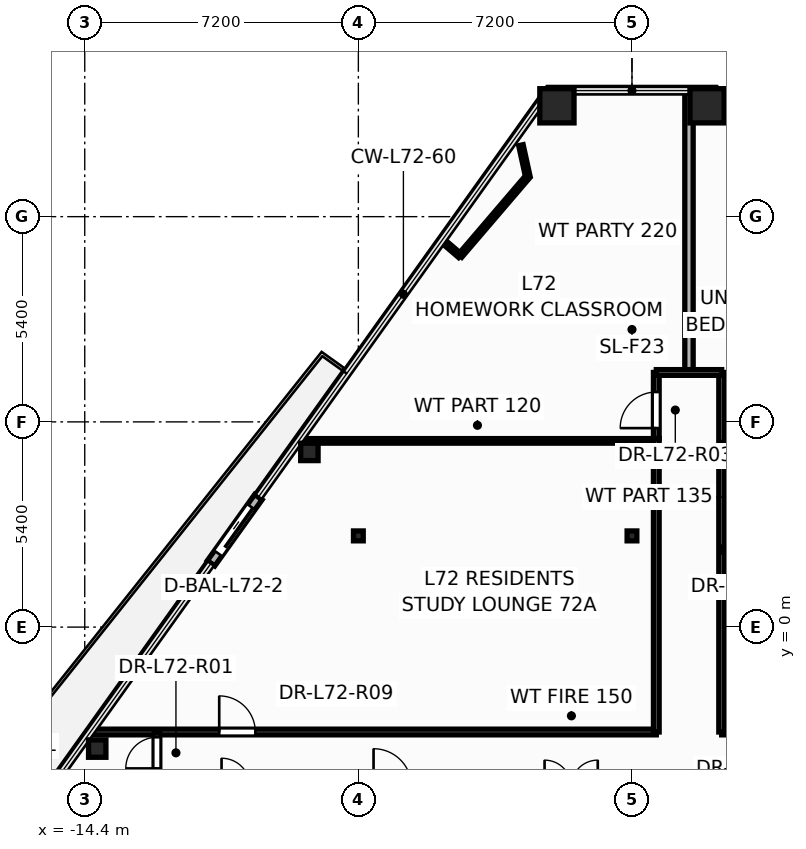
"""IFC4 building model, lengths in metres.
Left out: names, types, materials, properties, quantities, classifications, styles, units other than length and angle.
Written with IfcOpenShell. Run it as: python <this file> out.ifc"""

import sys

from ifc_helpers import new_model, si_unit, direction, frame, frame_2d, origin, origin_2d, place, context, subcontext, project, spatial, rectangle, hollow_rectangle, hollow_circle, i_section, extrude, element, fill, save


model = new_model("IFC4")
c1 = context("Model", 3, precision=1e-05, world=origin(), true_north=direction((0.0, 1.0)))
c2 = subcontext(c1, "Body", "Model", "MODEL_VIEW")
j1 = project(units=[si_unit("LENGTHUNIT", "METRE"), si_unit("PLANEANGLEUNIT", "RADIAN")], contexts=[c1])
p1 = place(None, origin())
s1 = spatial("IfcSite", under=j1, at=p1, CompositionType="ELEMENT")
p2 = place(p1, origin())
s2 = spatial("IfcBuilding", under=s1, at=p2, CompositionType="ELEMENT")
p3 = place(p2, frame((0.0, 0.0, 274.2)))
s3 = spatial("IfcBuildingStorey", under=s2, at=p3, CompositionType="ELEMENT", Elevation=274.2)
for number, where, z_axis, x_axis in (
    (1, (1.975, 13.717, 0.0), (0.0, 0.0, 1.0), (1.0, 0.0, 0.0)),
    (2, (-1.975, 13.717, 0.0), (0.0, 0.0, 1.0), (1.0, 0.0, 0.0)),
):
    element("IfcColumn", number, at=place(p3, frame(where, z_axis=z_axis, x_axis=x_axis)), inside=s3, PredefinedType="COLUMN", context=c2, shape_type="SweptSolid", body=[
        extrude(hollow_rectangle(XDim=0.9, YDim=0.9, WallThickness=0.04, at=origin_2d()), origin(), (0.0, 0.0, 1.0), 3.6),
    ])
for number, where, z_axis, x_axis in (
    (3, (-8.489, 4.61, 0.0), (0.0, 0.0, 1.0), (1.0, 0.0, 0.0)),
    (4, (-14.072, -3.196, 0.0), (0.0, 0.0, 1.0), (1.0, 0.0, 0.0)),
):
    element("IfcColumn", number, at=place(p3, frame(where, z_axis=z_axis, x_axis=x_axis)), inside=s3, PredefinedType="COLUMN", context=c2, shape_type="SweptSolid", body=[
        extrude(hollow_circle(Radius=0.229, WallThickness=0.016, at=origin_2d()), origin(), (0.0, 0.0, 1.0), 3.6),
    ])
for number, where, z_axis, x_axis in (
    (5, (-7.2, 2.4, 0.0), (0.0, 0.0, 1.0), (1.0, 0.0, 0.0)),
    (6, (0.0, 2.4, 0.0), (0.0, 0.0, 1.0), (1.0, 0.0, 0.0)),
    (7, (-4.8, 8.4, 0.0), (0.0, 0.0, 1.0), (1.0, 0.0, 0.0)),
    (8, (0.0, 8.4, 0.0), (0.0, 0.0, 1.0), (1.0, 0.0, 0.0)),
):
    element("IfcColumn", number, at=place(p3, frame(where, z_axis=z_axis, x_axis=x_axis)), inside=s3, PredefinedType="COLUMN", context=c2, shape_type="SweptSolid", body=[
        extrude(i_section(OverallWidth=0.256, OverallDepth=0.26, WebThickness=0.01, FlangeThickness=0.017, at=origin_2d()), origin(), (0.0, 0.0, 1.0), 3.6),
    ])
p4 = place(p3, frame((-9.831, 3.42, -0.015), z_axis=(0.0, 0.0, 1.0), x_axis=(-0.581756116184, -0.81336327756, 0.0)))
e9 = element("IfcWall", 9, at=p4, inside=s3, PredefinedType="STANDARD", context=c2, shape_type="SweptSolid", body=[
    extrude(rectangle(XDim=2.14, YDim=0.24, at=frame_2d((1.07, 0.0))), origin(), (0.0, 0.0, 1.0), 2.878),
])
p5 = place(p4, frame((0.32, 0.0, 0.015)))
e10 = element("IfcOpeningElement", 10, at=p5, cuts=e9, PredefinedType="OPENING", context=c2, shape_type="SweptSolid", body=[
    extrude(rectangle(XDim=1.506, YDim=2.204, at=frame_2d((0.75, 1.102))), frame((0.0, 0.13, 0.0), z_axis=(0.0, -1.0, 0.0), x_axis=(1.0, 0.0, 0.0)), (0.0, 0.0, 1.0), 0.26),
])
p6 = place(p3, frame((-14.251, -2.76, 0.0), z_axis=(0.0, 0.0, 1.0), x_axis=(1.0, 0.0, 0.0)))
e11 = element("IfcWall", 11, at=p6, inside=s3, PredefinedType="PARTITIONING", context=c2, shape_type="SweptSolid", body=[
    extrude(rectangle(XDim=14.891, YDim=0.15, at=frame_2d((7.446, 0.0))), origin(), (0.0, 0.0, 1.0), 2.32),
])
p7 = place(p6, frame((3.39, 0.0, 0.0)))
e12 = element("IfcOpeningElement", 12, at=p7, cuts=e11, PredefinedType="OPENING", context=c2, shape_type="SweptSolid", body=[
    extrude(rectangle(XDim=0.956, YDim=2.104, at=frame_2d((0.475, 1.052))), frame((0.0, 0.085, 0.0), z_axis=(0.0, -1.0, 0.0), x_axis=(1.0, 0.0, 0.0)), (0.0, 0.0, 1.0), 0.17),
])
p8 = place(p3, frame((-8.773, 4.9, 0.0), z_axis=(0.0, 0.0, 1.0), x_axis=(1.0, 0.0, 0.0)))
e13 = element("IfcWall", 13, at=p8, inside=s3, PredefinedType="PARTITIONING", context=c2, shape_type="SweptSolid", body=[
    extrude(rectangle(XDim=9.413, YDim=0.12, at=frame_2d((4.706, 0.0))), origin(), (0.0, 0.0, 1.0), 2.32),
])
p9 = place(p3, frame((0.64, -2.76, 0.0), z_axis=(0.0, 0.0, 1.0), x_axis=(0.0, 1.0, 0.0)))
e14 = element("IfcWall", 14, at=p9, inside=s3, PredefinedType="PARTITIONING", context=c2, shape_type="SweptSolid", body=[
    extrude(rectangle(XDim=7.72, YDim=0.15, at=frame_2d((3.86, 0.0))), origin(), (0.0, 0.0, 1.0), 2.32),
])
p10 = place(p3, frame((1.5, 6.7, 0.0), z_axis=(0.0, 0.0, 1.0), x_axis=(0.0, 1.0, 0.0)))
e15 = element("IfcWall", 15, at=p10, inside=s3, PredefinedType="PARTITIONING", context=c2, shape_type="SweptSolid", body=[
    extrude(rectangle(XDim=7.417, YDim=0.22, at=frame_2d((3.708, 0.0))), origin(), (0.0, 0.0, 1.0), 2.32),
])
p11 = place(p3, frame((2.36, -2.76, 0.0), z_axis=(0.0, 0.0, 1.0), x_axis=(1.0, 0.0, 0.0)))
e16 = element("IfcWall", 16, at=p11, inside=s3, PredefinedType="PARTITIONING", context=c2, shape_type="SweptSolid", body=[
    extrude(rectangle(XDim=4.978, YDim=0.15, at=frame_2d((2.489, 0.0))), origin(), (0.0, 0.0, 1.0), 2.32),
])
p12 = place(p11, frame((0.359, 0.0, 0.0)))
e17 = element("IfcOpeningElement", 17, at=p12, cuts=e16, PredefinedType="OPENING", context=c2, shape_type="SweptSolid", body=[
    extrude(rectangle(XDim=0.956, YDim=2.104, at=frame_2d((0.475, 1.052))), frame((0.0, 0.085, 0.0), z_axis=(0.0, -1.0, 0.0), x_axis=(1.0, 0.0, 0.0)), (0.0, 0.0, 1.0), 0.17),
])
p13 = place(p3, frame((2.36, -2.76, 0.0), z_axis=(0.0, 0.0, 1.0), x_axis=(0.0, 1.0, 0.0)))
e18 = element("IfcWall", 18, at=p13, inside=s3, PredefinedType="PARTITIONING", context=c2, shape_type="SweptSolid", body=[
    extrude(rectangle(XDim=9.46, YDim=0.15, at=frame_2d((4.73, 0.0))), origin(), (0.0, 0.0, 1.0), 2.32),
])
p14 = place(p3, frame((-2.741, 11.855, 0.0), z_axis=(0.0, 0.0, 1.0), x_axis=(-0.649984417987, -0.759947535277, 0.0)))
e19 = element("IfcWall", 19, at=p14, inside=s3, PredefinedType="PARTITIONING", context=c2, shape_type="SweptSolid", body=[
    extrude(rectangle(XDim=2.742, YDim=0.12, at=frame_2d((1.371, 0.0))), origin(), (0.0, 0.0, 1.0), 2.32),
])
p15 = place(p3, frame((0.64, 4.962, 0.0), z_axis=(0.0, 0.0, 1.0), x_axis=(0.0, 1.0, 0.0)))
e20 = element("IfcWall", 20, at=p15, inside=s3, PredefinedType="PARTITIONING", context=c2, shape_type="SweptSolid", body=[
    extrude(rectangle(XDim=1.738, YDim=0.15, at=frame_2d((0.869, 0.0))), origin(), (0.0, 0.0, 1.0), 3.345),
])
p16 = place(p15, frame((0.274, 0.0, 0.0)))
e21 = element("IfcOpeningElement", 21, at=p16, cuts=e20, PredefinedType="OPENING", context=c2, shape_type="SweptSolid", body=[
    extrude(rectangle(XDim=0.956, YDim=2.104, at=frame_2d((0.475, 1.052))), frame((0.0, 0.085, 0.0), z_axis=(0.0, -1.0, 0.0), x_axis=(1.0, 0.0, 0.0)), (0.0, 0.0, 1.0), 0.17),
])
p17 = place(p3, frame((-12.5, -4.24, 0.0), z_axis=(0.0, 0.0, 1.0), x_axis=(0.0, 1.0, 0.0)))
e22 = element("IfcWall", 22, at=p17, inside=s3, PredefinedType="PARTITIONING", context=c2, shape_type="SweptSolid", body=[
    extrude(rectangle(XDim=1.48, YDim=0.15, at=frame_2d((0.74, 0.0))), origin(), (0.0, 0.0, 1.0), 2.32),
])
p18 = place(p17, frame((0.522, 0.0, 0.0)))
e23 = element("IfcOpeningElement", 23, at=p18, cuts=e22, PredefinedType="OPENING", context=c2, shape_type="SweptSolid", body=[
    extrude(rectangle(XDim=0.826, YDim=2.104, at=frame_2d((0.41, 1.052))), frame((0.0, 0.085, 0.0), z_axis=(0.0, -1.0, 0.0), x_axis=(1.0, 0.0, 0.0)), (0.0, 0.0, 1.0), 0.17),
])
p19 = place(p3, frame((2.36, 2.04, 0.0), z_axis=(0.0, 0.0, 1.0), x_axis=(1.0, 0.0, 0.0)))
e24 = element("IfcWall", 24, at=p19, inside=s3, PredefinedType="PARTITIONING", context=c2, shape_type="SweptSolid", body=[
    extrude(rectangle(XDim=1.318, YDim=0.135, at=frame_2d((0.659, 0.0))), origin(), (0.0, 0.0, 1.0), 2.964),
])
p20 = place(p19, frame((0.276, 0.0, 0.0)))
e25 = element("IfcOpeningElement", 25, at=p20, cuts=e24, PredefinedType="OPENING", context=c2, shape_type="SweptSolid", body=[
    extrude(rectangle(XDim=0.856, YDim=2.104, at=frame_2d((0.425, 1.052))), frame((0.0, 0.078, 0.0), z_axis=(0.0, -1.0, 0.0), x_axis=(1.0, 0.0, 0.0)), (0.0, 0.0, 1.0), 0.155),
])
p21 = place(p3, frame((2.36, 4.8, 0.0), z_axis=(0.0, 0.0, 1.0), x_axis=(1.0, 0.0, 0.0)))
e26 = element("IfcWall", 26, at=p21, inside=s3, PredefinedType="PARTITIONING", context=c2, shape_type="SweptSolid", body=[
    extrude(rectangle(XDim=1.4, YDim=0.135, at=frame_2d((0.7, 0.0))), origin(), (0.0, 0.0, 1.0), 2.964),
])
p22 = place(p3, frame((0.64, 6.7, 0.0), z_axis=(0.0, 0.0, 1.0), x_axis=(1.0, 0.0, 0.0)))
e27 = element("IfcWall", 27, at=p22, inside=s3, PredefinedType="PARTITIONING", context=c2, shape_type="SweptSolid", body=[
    extrude(rectangle(XDim=1.72, YDim=0.15, at=frame_2d((0.86, 0.0))), origin(), (0.0, 0.0, 1.0), 2.964),
])
p23 = place(p3, frame((-2.922, 12.681, 0.0), z_axis=(0.0, 0.0, 1.0), x_axis=(0.213963823388, -0.976841585049, 0.0)))
e28 = element("IfcWall", 28, at=p23, inside=s3, PredefinedType="PARTITIONING", context=c2, shape_type="SweptSolid", body=[
    extrude(rectangle(XDim=0.845, YDim=0.12, at=frame_2d((0.423, 0.0))), origin(), (0.0, 0.0, 1.0), 2.32),
])
p24 = place(p3, frame((-4.524, 9.771, 0.0), z_axis=(0.0, 0.0, 1.0), x_axis=(-0.759789025065, 0.650169698918, 0.0)))
e29 = element("IfcWall", 29, at=p24, inside=s3, PredefinedType="PARTITIONING", context=c2, shape_type="SweptSolid", body=[
    extrude(rectangle(XDim=0.615, YDim=0.12, at=frame_2d((0.307, 0.0))), origin(), (0.0, 0.0, 1.0), 2.863),
])
p25 = place(p5, origin())
e30 = element("IfcDoor", 30, at=p25, inside=s3, OperationType="SLIDING_TO_RIGHT", PredefinedType="DOOR", context=c2, shape_type="SweptSolid", body=[
    extrude(rectangle(XDim=1.5, YDim=2.2, at=frame_2d((0.75, 1.1))), frame((0.0, 0.025, 0.0), z_axis=(0.0, -1.0, 0.0), x_axis=(1.0, 0.0, 0.0)), (0.0, 0.0, 1.0), 0.05),
])
fill(e10, e30)
p26 = place(p18, origin())
e31 = element("IfcDoor", 31, at=p26, inside=s3, OperationType="SINGLE_SWING_LEFT", PredefinedType="DOOR", context=c2, shape_type="SweptSolid", body=[
    extrude(rectangle(XDim=0.82, YDim=2.1, at=frame_2d((0.41, 1.05))), frame((0.0, 0.025, 0.0), z_axis=(0.0, -1.0, 0.0), x_axis=(1.0, 0.0, 0.0)), (0.0, 0.0, 1.0), 0.05),
])
fill(e23, e31)
p27 = place(p16, origin())
e32 = element("IfcDoor", 32, at=p27, inside=s3, OperationType="SINGLE_SWING_LEFT", PredefinedType="DOOR", context=c2, shape_type="SweptSolid", body=[
    extrude(rectangle(XDim=0.95, YDim=2.1, at=frame_2d((0.475, 1.05))), frame((0.0, 0.025, 0.0), z_axis=(0.0, -1.0, 0.0), x_axis=(1.0, 0.0, 0.0)), (0.0, 0.0, 1.0), 0.05),
])
fill(e21, e32)
p28 = place(p7, origin())
e33 = element("IfcDoor", 33, at=p28, inside=s3, OperationType="SINGLE_SWING_LEFT", PredefinedType="DOOR", context=c2, shape_type="SweptSolid", body=[
    extrude(rectangle(XDim=0.95, YDim=2.1, at=frame_2d((0.475, 1.05))), frame((0.0, 0.025, 0.0), z_axis=(0.0, -1.0, 0.0), x_axis=(1.0, 0.0, 0.0)), (0.0, 0.0, 1.0), 0.05),
])
fill(e12, e33)
save(model, sys.argv[1])
